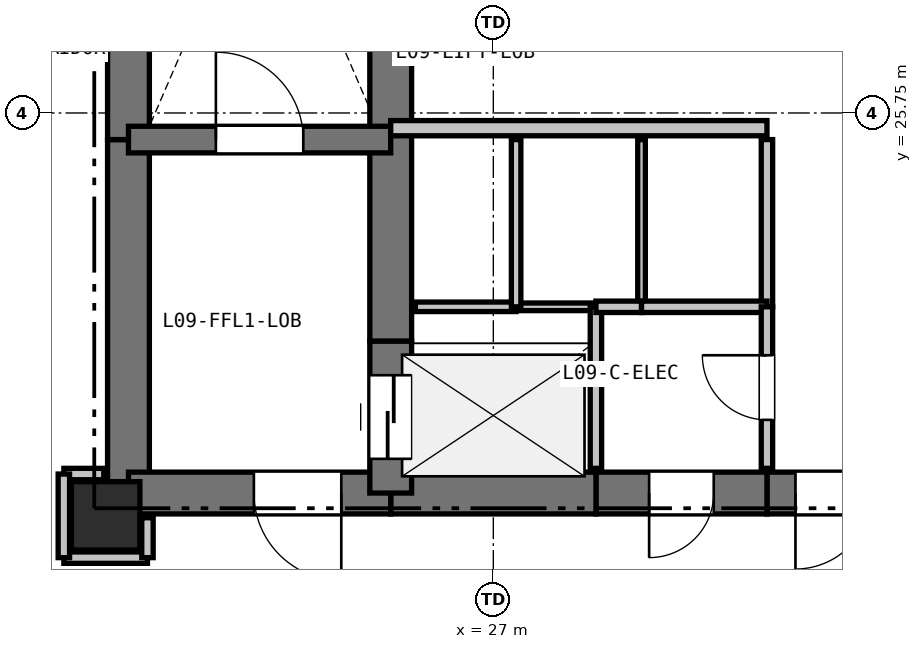
"""IFC4 building model, lengths in metres.
Left out: names, types, materials, properties, quantities, classifications, styles, units other than length and angle.
Written with IfcOpenShell. Run it as: python <this file> out.ifc"""

import sys

from ifc_helpers import new_model, si_unit, direction, frame, frame_2d, origin, origin_2d, place, context, subcontext, project, spatial, rectangle, extrude, element, fill, save


model = new_model("IFC4")
c1 = context("Model", 3, precision=1e-05, world=origin(), true_north=direction((0.0, 1.0)))
c2 = subcontext(c1, "Body", "Model", "MODEL_VIEW")
j1 = project(units=[si_unit("LENGTHUNIT", "METRE"), si_unit("PLANEANGLEUNIT", "RADIAN")], contexts=[c1])
p1 = place(None, origin())
s1 = spatial("IfcSite", under=j1, at=p1, CompositionType="ELEMENT")
p2 = place(p1, origin())
s2 = spatial("IfcBuilding", under=s1, at=p2, CompositionType="ELEMENT")
p3 = place(p2, frame((0.0, 0.0, 35.7)))
s3 = spatial("IfcBuildingStorey", under=s2, at=p3, CompositionType="ELEMENT", Elevation=35.7)
p4 = place(p3, frame((21.9, 20.45, 0.0), z_axis=(0.0, 0.0, 1.0), x_axis=(1.0, 0.0, 0.0)))
e1 = element("IfcColumn", 1, at=p4, inside=s3, PredefinedType="COLUMN", context=c2, shape_type="SweptSolid", body=[
    extrude(rectangle(XDim=0.9, YDim=0.9, at=origin_2d()), origin(), (0.0, 0.0, 1.0), 3.3),
])
p5 = place(p3, frame((22.2, 20.75, 0.0), z_axis=(0.0, 0.0, 1.0), x_axis=(0.0, 1.0, 0.0)))
e2 = element("IfcWall", 2, at=p5, inside=s3, PredefinedType="SHEAR", context=c2, shape_type="SweptSolid", body=[
    extrude(rectangle(XDim=4.65, YDim=0.55, at=frame_2d((2.325, 0.0))), origin(), (0.0, 0.0, 1.0), 3.04),
])
p6 = place(p3, frame((22.2, 25.4, 0.0), z_axis=(0.0, 0.0, 1.0), x_axis=(0.0, 1.0, 0.0)))
e3 = element("IfcWall", 3, at=p6, inside=s3, PredefinedType="SHEAR", context=c2, shape_type="SweptSolid", body=[
    extrude(rectangle(XDim=7.35, YDim=0.55, at=frame_2d((3.675, 0.0))), origin(), (0.0, 0.0, 1.0), 3.04),
])
p7 = place(p3, frame((32.35, 20.75, 0.0), z_axis=(0.0, 0.0, 1.0), x_axis=(-1.0, 0.0, 0.0)))
e4 = element("IfcWall", 4, at=p7, inside=s3, PredefinedType="SHEAR", context=c2, shape_type="SweptSolid", body=[
    extrude(rectangle(XDim=1.75, YDim=0.55, at=frame_2d((0.875, 0.0))), origin(), (0.0, 0.0, 1.0), 3.04),
])
p8 = place(p7, frame((0.375, 0.0, 0.0)))
e5 = element("IfcOpeningElement", 5, at=p8, cuts=e4, PredefinedType="OPENING", context=c2, shape_type="SweptSolid", body=[
    extrude(rectangle(XDim=1.0, YDim=2.15, at=frame_2d((0.5, 1.075))), frame((0.0, 0.285, 0.0), z_axis=(0.0, -1.0, 0.0), x_axis=(1.0, 0.0, 0.0)), (0.0, 0.0, 1.0), 0.57),
])
p9 = place(p3, frame((30.6, 20.75, 0.0), z_axis=(0.0, 0.0, 1.0), x_axis=(-1.0, 0.0, 0.0)))
e6 = element("IfcWall", 6, at=p9, inside=s3, PredefinedType="SHEAR", context=c2, shape_type="SweptSolid", body=[
    extrude(rectangle(XDim=2.25, YDim=0.55, at=frame_2d((1.125, 0.0))), origin(), (0.0, 0.0, 1.0), 3.04),
])
p10 = place(p9, frame((0.7, 0.0, 0.0)))
e7 = element("IfcOpeningElement", 7, at=p10, cuts=e6, PredefinedType="OPENING", context=c2, shape_type="SweptSolid", body=[
    extrude(rectangle(XDim=0.85, YDim=2.1, at=frame_2d((0.425, 1.05))), frame((0.0, 0.285, 0.0), z_axis=(0.0, -1.0, 0.0), x_axis=(1.0, 0.0, 0.0)), (0.0, 0.0, 1.0), 0.57),
])
p11 = place(p3, frame((28.35, 20.75, 0.0), z_axis=(0.0, 0.0, 1.0), x_axis=(-1.0, 0.0, 0.0)))
e8 = element("IfcWall", 8, at=p11, inside=s3, PredefinedType="SHEAR", context=c2, shape_type="SweptSolid", body=[
    extrude(rectangle(XDim=2.7, YDim=0.55, at=frame_2d((1.35, 0.0))), origin(), (0.0, 0.0, 1.0), 3.04),
])
p12 = place(p3, frame((25.65, 20.75, 0.0), z_axis=(0.0, 0.0, 1.0), x_axis=(-1.0, 0.0, 0.0)))
e9 = element("IfcWall", 9, at=p12, inside=s3, PredefinedType="SHEAR", context=c2, shape_type="SweptSolid", body=[
    extrude(rectangle(XDim=3.45, YDim=0.55, at=frame_2d((1.725, 0.0))), origin(), (0.0, 0.0, 1.0), 3.04),
])
p13 = place(p12, frame((0.65, 0.0, 0.0)))
e10 = element("IfcOpeningElement", 10, at=p13, cuts=e9, PredefinedType="OPENING", context=c2, shape_type="SweptSolid", body=[
    extrude(rectangle(XDim=1.15, YDim=2.15, at=frame_2d((0.575, 1.075))), frame((0.0, 0.285, 0.0), z_axis=(0.0, -1.0, 0.0), x_axis=(1.0, 0.0, 0.0)), (0.0, 0.0, 1.0), 0.57),
])
p14 = place(p3, frame((25.65, 20.75, 0.0), z_axis=(0.0, 0.0, 1.0), x_axis=(0.0, 1.0, 0.0)))
e11 = element("IfcWall", 11, at=p14, inside=s3, PredefinedType="SHEAR", context=c2, shape_type="SweptSolid", body=[
    extrude(rectangle(XDim=2.0, YDim=0.55, at=frame_2d((1.0, 0.0))), origin(), (0.0, 0.0, 1.0), 3.04),
])
p15 = place(p14, frame((0.45, 0.0, 0.0)))
e12 = element("IfcOpeningElement", 12, at=p15, cuts=e11, PredefinedType="OPENING", context=c2, shape_type="SweptSolid", body=[
    extrude(rectangle(XDim=1.1, YDim=2.15, at=frame_2d((0.55, 1.075))), frame((0.0, 0.285, 0.0), z_axis=(0.0, -1.0, 0.0), x_axis=(1.0, 0.0, 0.0)), (0.0, 0.0, 1.0), 0.57),
])
p16 = place(p3, frame((25.65, 22.75, 0.0), z_axis=(0.0, 0.0, 1.0), x_axis=(0.0, 1.0, 0.0)))
e13 = element("IfcWall", 13, at=p16, inside=s3, PredefinedType="SHEAR", context=c2, shape_type="SweptSolid", body=[
    extrude(rectangle(XDim=2.8, YDim=0.55, at=frame_2d((1.4, 0.0))), origin(), (0.0, 0.0, 1.0), 3.04),
])
p17 = place(p3, frame((25.65, 25.55, 0.0), z_axis=(0.0, 0.0, 1.0), x_axis=(0.0, 1.0, 0.0)))
e14 = element("IfcWall", 14, at=p17, inside=s3, PredefinedType="SHEAR", context=c2, shape_type="SweptSolid", body=[
    extrude(rectangle(XDim=2.4, YDim=0.55, at=frame_2d((1.2, 0.0))), origin(), (0.0, 0.0, 1.0), 3.04),
])
p18 = place(p3, frame((22.2, 25.4, 0.0), z_axis=(0.0, 0.0, 1.0), x_axis=(1.0, 0.0, 0.0)))
e15 = element("IfcWall", 15, at=p18, inside=s3, PredefinedType="SHEAR", context=c2, shape_type="SweptSolid", body=[
    extrude(rectangle(XDim=3.45, YDim=0.35, at=frame_2d((1.725, 0.0))), origin(), (0.0, 0.0, 1.0), 3.04),
])
p19 = place(p18, frame((1.15, 0.0, 0.0)))
e16 = element("IfcOpeningElement", 16, at=p19, cuts=e15, PredefinedType="OPENING", context=c2, shape_type="SweptSolid", body=[
    extrude(rectangle(XDim=1.15, YDim=2.15, at=frame_2d((0.575, 1.075))), frame((0.0, 0.185, 0.0), z_axis=(0.0, -1.0, 0.0), x_axis=(1.0, 0.0, 0.0)), (0.0, 0.0, 1.0), 0.37),
])
p20 = place(p3, frame((25.65, 25.55, 0.0), z_axis=(0.0, 0.0, 1.0), x_axis=(1.0, 0.0, 0.0)))
e17 = element("IfcWall", 17, at=p20, inside=s3, PredefinedType="PARTITIONING", context=c2, shape_type="SweptSolid", body=[
    extrude(rectangle(XDim=4.95, YDim=0.2, at=frame_2d((2.475, 0.0))), origin(), (0.0, 0.0, 1.0), 3.04),
])
p21 = place(p3, frame((25.975, 23.2, 0.0), z_axis=(0.0, 0.0, 1.0), x_axis=(1.0, 0.0, 0.0)))
e18 = element("IfcWall", 18, at=p21, inside=s3, PredefinedType="PARTITIONING", context=c2, shape_type="SweptSolid", body=[
    extrude(rectangle(XDim=1.325, YDim=0.125, at=frame_2d((0.663, 0.0))), origin(), (0.0, 0.0, 1.0), 3.04),
])
p22 = place(p3, frame((27.3, 23.2, 0.0), z_axis=(0.0, 0.0, 1.0), x_axis=(1.0, 0.0, 0.0)))
e19 = element("IfcWall", 19, at=p22, inside=s3, PredefinedType="PARTITIONING", context=c2, shape_type="SweptSolid", body=[
    extrude(rectangle(XDim=1.05, YDim=0.1, at=frame_2d((0.525, 0.0))), origin(), (0.0, 0.0, 1.0), 3.04),
])
p23 = place(p3, frame((28.35, 23.2, 0.0), z_axis=(0.0, 0.0, 1.0), x_axis=(0.0, -1.0, 0.0)))
e20 = element("IfcWall", 20, at=p23, inside=s3, PredefinedType="PARTITIONING", context=c2, shape_type="SweptSolid", body=[
    extrude(rectangle(XDim=2.125, YDim=0.15, at=frame_2d((1.062, 0.0))), origin(), (0.0, 0.0, 1.0), 3.04),
])
p24 = place(p3, frame((27.3, 25.4, 0.0), z_axis=(0.0, 0.0, 1.0), x_axis=(0.0, -1.0, 0.0)))
e21 = element("IfcWall", 21, at=p24, inside=s3, PredefinedType="PARTITIONING", context=c2, shape_type="SweptSolid", body=[
    extrude(rectangle(XDim=2.2, YDim=0.125, at=frame_2d((1.1, 0.0))), origin(), (0.0, 0.0, 1.0), 3.04),
])
p25 = place(p3, frame((28.95, 25.4, 0.0), z_axis=(0.0, 0.0, 1.0), x_axis=(0.0, -1.0, 0.0)))
e22 = element("IfcWall", 22, at=p25, inside=s3, PredefinedType="PARTITIONING", context=c2, shape_type="SweptSolid", body=[
    extrude(rectangle(XDim=2.2, YDim=0.1, at=frame_2d((1.1, 0.0))), origin(), (0.0, 0.0, 1.0), 3.04),
])
p26 = place(p3, frame((28.95, 23.2, 0.0), z_axis=(0.0, 0.0, 1.0), x_axis=(-1.0, 0.0, 0.0)))
e23 = element("IfcWall", 23, at=p26, inside=s3, PredefinedType="PARTITIONING", context=c2, shape_type="SweptSolid", body=[
    extrude(rectangle(XDim=0.6, YDim=0.15, at=frame_2d((0.3, 0.0))), origin(), (0.0, 0.0, 1.0), 3.04),
])
p27 = place(p3, frame((30.6, 25.4, 0.0), z_axis=(0.0, 0.0, 1.0), x_axis=(0.0, -1.0, 0.0)))
e24 = element("IfcWall", 24, at=p27, inside=s3, PredefinedType="PARTITIONING", context=c2, shape_type="SweptSolid", body=[
    extrude(rectangle(XDim=2.2, YDim=0.15, at=frame_2d((1.1, 0.0))), origin(), (0.0, 0.0, 1.0), 3.04),
])
p28 = place(p3, frame((30.6, 23.2, 0.0), z_axis=(0.0, 0.0, 1.0), x_axis=(-1.0, 0.0, 0.0)))
e25 = element("IfcWall", 25, at=p28, inside=s3, PredefinedType="PARTITIONING", context=c2, shape_type="SweptSolid", body=[
    extrude(rectangle(XDim=1.65, YDim=0.15, at=frame_2d((0.825, 0.0))), origin(), (0.0, 0.0, 1.0), 3.04),
])
p29 = place(p3, frame((30.6, 21.075, 0.0), z_axis=(0.0, 0.0, 1.0), x_axis=(0.0, 1.0, 0.0)))
e26 = element("IfcWall", 26, at=p29, inside=s3, PredefinedType="PARTITIONING", context=c2, shape_type="SweptSolid", body=[
    extrude(rectangle(XDim=2.125, YDim=0.15, at=frame_2d((1.062, 0.0))), origin(), (0.0, 0.0, 1.0), 3.04),
])
p30 = place(p29, frame((0.637, 0.0, 0.0)))
e27 = element("IfcOpeningElement", 27, at=p30, cuts=e26, PredefinedType="OPENING", context=c2, shape_type="SweptSolid", body=[
    extrude(rectangle(XDim=0.85, YDim=2.1, at=frame_2d((0.425, 1.05))), frame((0.0, 0.085, 0.0), z_axis=(0.0, -1.0, 0.0), x_axis=(1.0, 0.0, 0.0)), (0.0, 0.0, 1.0), 0.17),
])
p31 = place(p3, frame((21.35, 19.9, 0.0), z_axis=(0.0, 0.0, 1.0), x_axis=(1.0, 0.0, 0.0)))
e28 = element("IfcWall", 28, at=p31, inside=s3, PredefinedType="PARTITIONING", context=c2, shape_type="SweptSolid", body=[
    extrude(rectangle(XDim=1.1, YDim=0.15, at=frame_2d((0.55, 0.0))), origin(), (0.0, 0.0, 1.0), 2.338),
])
p32 = place(p3, frame((22.45, 19.9, 0.0), z_axis=(0.0, 0.0, 1.0), x_axis=(0.0, 1.0, 0.0)))
e29 = element("IfcWall", 29, at=p32, inside=s3, PredefinedType="PARTITIONING", context=c2, shape_type="SweptSolid", body=[
    extrude(rectangle(XDim=0.525, YDim=0.15, at=frame_2d((0.263, 0.0))), origin(), (0.0, 0.0, 1.0), 2.338),
])
p33 = place(p3, frame((21.875, 21.0, 0.0), z_axis=(0.0, 0.0, 1.0), x_axis=(-1.0, 0.0, 0.0)))
e30 = element("IfcWall", 30, at=p33, inside=s3, PredefinedType="PARTITIONING", context=c2, shape_type="SweptSolid", body=[
    extrude(rectangle(XDim=0.525, YDim=0.15, at=frame_2d((0.262, 0.0))), origin(), (0.0, 0.0, 1.0), 2.488),
])
p34 = place(p3, frame((21.35, 21.0, 0.0), z_axis=(0.0, 0.0, 1.0), x_axis=(0.0, -1.0, 0.0)))
e31 = element("IfcWall", 31, at=p34, inside=s3, PredefinedType="PARTITIONING", context=c2, shape_type="SweptSolid", body=[
    extrude(rectangle(XDim=1.1, YDim=0.15, at=frame_2d((0.55, 0.0))), origin(), (0.0, 0.0, 1.0), 2.338),
])
p35 = place(p8, origin())
e32 = element("IfcDoor", 32, at=p35, inside=s3, OperationType="SINGLE_SWING_RIGHT", PredefinedType="DOOR", context=c2, shape_type="SweptSolid", body=[
    extrude(rectangle(XDim=1.0, YDim=2.15, at=frame_2d((0.5, 1.075))), frame((0.0, 0.025, 0.0), z_axis=(0.0, -1.0, 0.0), x_axis=(1.0, 0.0, 0.0)), (0.0, 0.0, 1.0), 0.05),
])
fill(e5, e32)
p36 = place(p15, origin())
e33 = element("IfcDoor", 33, at=p36, inside=s3, OperationType="SLIDING_TO_LEFT", PredefinedType="DOOR", context=c2, shape_type="SweptSolid", body=[
    extrude(rectangle(XDim=1.1, YDim=2.15, at=frame_2d((0.55, 1.075))), frame((0.0, 0.025, 0.0), z_axis=(0.0, -1.0, 0.0), x_axis=(1.0, 0.0, 0.0)), (0.0, 0.0, 1.0), 0.05),
])
fill(e12, e33)
p37 = place(p19, origin())
e34 = element("IfcDoor", 34, at=p37, inside=s3, OperationType="SINGLE_SWING_LEFT", PredefinedType="DOOR", context=c2, shape_type="SweptSolid", body=[
    extrude(rectangle(XDim=1.15, YDim=2.15, at=frame_2d((0.575, 1.075))), frame((0.0, 0.025, 0.0), z_axis=(0.0, -1.0, 0.0), x_axis=(1.0, 0.0, 0.0)), (0.0, 0.0, 1.0), 0.05),
])
fill(e16, e34)
p38 = place(p13, origin())
e35 = element("IfcDoor", 35, at=p38, inside=s3, OperationType="SINGLE_SWING_LEFT", PredefinedType="DOOR", context=c2, shape_type="SweptSolid", body=[
    extrude(rectangle(XDim=1.15, YDim=2.15, at=frame_2d((0.575, 1.075))), frame((0.0, 0.025, 0.0), z_axis=(0.0, -1.0, 0.0), x_axis=(1.0, 0.0, 0.0)), (0.0, 0.0, 1.0), 0.05),
])
fill(e10, e35)
p39 = place(p30, origin())
e36 = element("IfcDoor", 36, at=p39, inside=s3, OperationType="SINGLE_SWING_RIGHT", PredefinedType="DOOR", context=c2, shape_type="SweptSolid", body=[
    extrude(rectangle(XDim=0.85, YDim=2.1, at=frame_2d((0.425, 1.05))), frame((0.0, 0.025, 0.0), z_axis=(0.0, -1.0, 0.0), x_axis=(1.0, 0.0, 0.0)), (0.0, 0.0, 1.0), 0.05),
])
fill(e27, e36)
p40 = place(p10, origin())
e37 = element("IfcDoor", 37, at=p40, inside=s3, OperationType="SINGLE_SWING_RIGHT", PredefinedType="DOOR", context=c2, shape_type="SweptSolid", body=[
    extrude(rectangle(XDim=0.85, YDim=2.1, at=frame_2d((0.425, 1.05))), frame((0.0, 0.025, 0.0), z_axis=(0.0, -1.0, 0.0), x_axis=(1.0, 0.0, 0.0)), (0.0, 0.0, 1.0), 0.05),
])
fill(e7, e37)
save(model, sys.argv[1])
